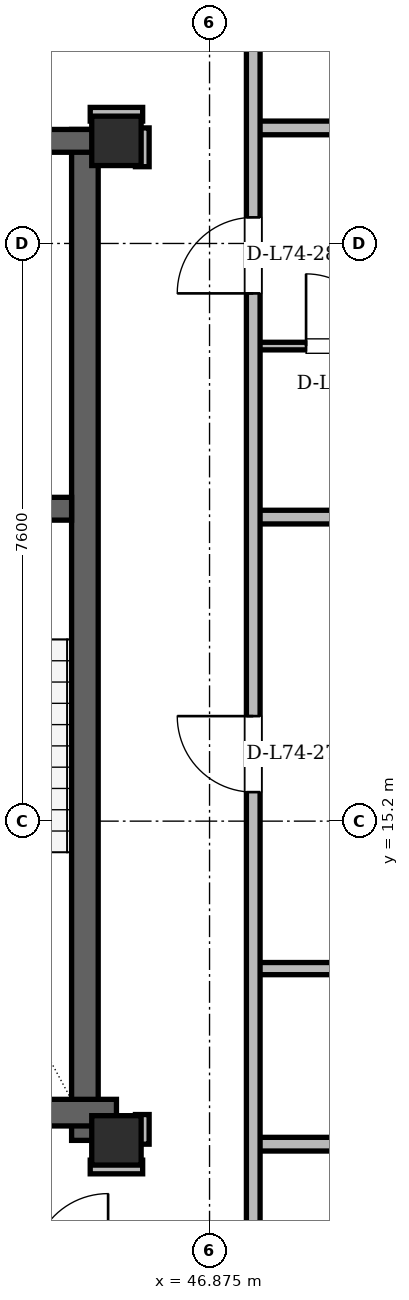
"""IFC4 building model, lengths in metres.
Left out: names, types, materials, properties, quantities, classifications, styles, units other than length and angle.
Written with IfcOpenShell. Run it as: python <this file> out.ifc"""

import sys

from ifc_helpers import new_model, si_unit, direction, frame, frame_2d, origin, origin_2d, place, context, subcontext, project, spatial, rectangle, hollow_rectangle, extrude, element, fill, save


model = new_model("IFC4")
c1 = context("Model", 3, precision=1e-05, world=origin(), true_north=direction((0.0, 1.0)))
c2 = subcontext(c1, "Body", "Model", "MODEL_VIEW")
j1 = project(units=[si_unit("LENGTHUNIT", "METRE"), si_unit("PLANEANGLEUNIT", "RADIAN")], contexts=[c1])
p1 = place(None, origin())
s1 = spatial("IfcSite", under=j1, at=p1, CompositionType="ELEMENT")
p2 = place(p1, origin())
s2 = spatial("IfcBuilding", under=s1, at=p2, CompositionType="ELEMENT")
p3 = place(p2, frame((0.0, 0.0, 281.1)))
s3 = spatial("IfcBuildingStorey", under=s2, at=p3, CompositionType="ELEMENT", Elevation=281.1)
for number, where, z_axis, x_axis in (
    (1, (45.65, 11.0, 0.0), (0.0, 0.0, 1.0), (1.0, 0.0, 0.0)),
    (2, (45.65, 24.15, 0.0), (0.0, 0.0, 1.0), (1.0, 0.0, 0.0)),
):
    element("IfcColumn", number, at=place(p3, frame(where, z_axis=z_axis, x_axis=x_axis)), inside=s3, PredefinedType="COLUMN", context=c2, shape_type="SweptSolid", body=[
        extrude(hollow_rectangle(XDim=0.65, YDim=0.65, WallThickness=0.05, at=origin_2d()), origin(), (0.0, 0.0, 1.0), 3.9),
    ])
p4 = place(p3, frame((45.235, 11.0, 0.0), z_axis=(0.0, 0.0, 1.0), x_axis=(0.0, 1.0, 0.0)))
e3 = element("IfcWall", 3, at=p4, inside=s3, PredefinedType="SHEAR", context=c2, shape_type="SweptSolid", body=[
    extrude(rectangle(XDim=13.3, YDim=0.35, at=frame_2d((6.65, 0.0))), origin(), (0.0, 0.0, 1.0), 3.68),
])
p5 = place(p3, frame((38.55, 11.365, 0.0), z_axis=(0.0, 0.0, 1.0), x_axis=(1.0, 0.0, 0.0)))
e4 = element("IfcWall", 4, at=p5, inside=s3, PredefinedType="SHEAR", context=c2, shape_type="SweptSolid", body=[
    extrude(rectangle(XDim=7.1, YDim=0.35, at=frame_2d((3.55, 0.0))), origin(), (0.0, 0.0, 1.0), 3.68),
])
p6 = place(p3, frame((29.65, 24.15, 0.0), z_axis=(0.0, 0.0, 1.0), x_axis=(1.0, 0.0, 0.0)))
e5 = element("IfcWall", 5, at=p6, inside=s3, PredefinedType="SHEAR", context=c2, shape_type="SweptSolid", body=[
    extrude(rectangle(XDim=15.7, YDim=0.3, at=frame_2d((7.85, 0.0))), origin(), (0.0, 0.0, 1.0), 3.68),
])
p7 = place(p6, frame((1.7, 0.0, 0.0)))
e6 = element("IfcOpeningElement", 6, at=p7, cuts=e5, PredefinedType="OPENING", context=c2, shape_type="SweptSolid", body=[
    extrude(rectangle(XDim=1.2, YDim=2.2, at=frame_2d((0.6, 1.1))), frame((0.0, 0.15, 0.0), z_axis=(0.0, -1.0, 0.0), x_axis=(1.0, 0.0, 0.0)), (0.0, 0.0, 1.0), 0.3),
])
p8 = place(p6, frame((12.8, 0.0, 0.0)))
e7 = element("IfcOpeningElement", 7, at=p8, cuts=e5, PredefinedType="OPENING", context=c2, shape_type="SweptSolid", body=[
    extrude(rectangle(XDim=1.2, YDim=2.2, at=frame_2d((0.6, 1.1))), frame((0.0, 0.15, 0.0), z_axis=(0.0, -1.0, 0.0), x_axis=(1.0, 0.0, 0.0)), (0.0, 0.0, 1.0), 0.3),
])
p9 = place(p6, frame((6.55, 0.0, 0.0)))
e8 = element("IfcOpeningElement", 8, at=p9, cuts=e5, PredefinedType="OPENING", context=c2, shape_type="SweptSolid", body=[
    extrude(rectangle(XDim=0.9, YDim=2.05, at=frame_2d((0.45, 1.025))), frame((0.0, 0.15, 0.0), z_axis=(0.0, -1.0, 0.0), x_axis=(1.0, 0.0, 0.0)), (0.0, 0.0, 1.0), 0.3),
])
p10 = place(p6, frame((8.45, 0.0, 0.0)))
e9 = element("IfcOpeningElement", 9, at=p10, cuts=e5, PredefinedType="OPENING", context=c2, shape_type="SweptSolid", body=[
    extrude(rectangle(XDim=0.9, YDim=2.05, at=frame_2d((0.45, 1.025))), frame((0.0, 0.15, 0.0), z_axis=(0.0, -1.0, 0.0), x_axis=(1.0, 0.0, 0.0)), (0.0, 0.0, 1.0), 0.3),
])
p11 = place(p3, frame((41.05, 19.31, 0.0), z_axis=(0.0, 0.0, 1.0), x_axis=(1.0, 0.0, 0.0)))
e10 = element("IfcWall", 10, at=p11, inside=s3, PredefinedType="SHEAR", context=c2, shape_type="SweptSolid", body=[
    extrude(rectangle(XDim=4.01, YDim=0.3, at=frame_2d((2.005, 0.0))), origin(), (0.0, 0.0, 1.0), 3.68),
])
p12 = place(p11, frame((1.6, 0.0, 0.0)))
e11 = element("IfcOpeningElement", 11, at=p12, cuts=e10, PredefinedType="OPENING", context=c2, shape_type="SweptSolid", body=[
    extrude(rectangle(XDim=1.4, YDim=2.2, at=frame_2d((0.7, 1.1))), frame((0.0, 0.15, 0.0), z_axis=(0.0, -1.0, 0.0), x_axis=(1.0, 0.0, 0.0)), (0.0, 0.0, 1.0), 0.3),
])
p13 = place(p3, frame((58.454, 10.584, 0.0), z_axis=(0.0, 0.0, 1.0), x_axis=(-0.500002460556, 0.866023983177, 0.0)))
e12 = element("IfcWall", 12, at=p13, inside=s3, PredefinedType="SOLIDWALL", context=c2, shape_type="SweptSolid", body=[
    extrude(rectangle(XDim=37.435, YDim=0.29, at=frame_2d((18.718, 0.0))), origin(), (0.0, 0.0, 1.0), 3.058),
])
p14 = place(p13, frame((3.639, 0.0, 0.0)))
e13 = element("IfcOpeningElement", 13, at=p14, cuts=e12, PredefinedType="OPENING", context=c2, shape_type="SweptSolid", body=[
    extrude(rectangle(XDim=1.5, YDim=2.2, at=frame_2d((0.75, 1.1))), frame((0.0, 0.145, 0.0), z_axis=(0.0, -1.0, 0.0), x_axis=(1.0, 0.0, 0.0)), (0.0, 0.0, 1.0), 0.29),
])
p15 = place(p13, frame((27.901, 0.0, 0.0)))
e14 = element("IfcOpeningElement", 14, at=p15, cuts=e12, PredefinedType="OPENING", context=c2, shape_type="SweptSolid", body=[
    extrude(rectangle(XDim=1.5, YDim=2.2, at=frame_2d((0.75, 1.1))), frame((0.0, 0.145, 0.0), z_axis=(0.0, -1.0, 0.0), x_axis=(1.0, 0.0, 0.0)), (0.0, 0.0, 1.0), 0.29),
])
p16 = place(p13, frame((0.782, 0.0, 0.85)))
e15 = element("IfcOpeningElement", 15, at=p16, cuts=e12, PredefinedType="OPENING", context=c2, shape_type="SweptSolid", body=[
    extrude(rectangle(XDim=1.2, YDim=1.48, at=frame_2d((0.6, 0.74))), frame((0.0, 0.145, 0.0), z_axis=(0.0, -1.0, 0.0), x_axis=(1.0, 0.0, 0.0)), (0.0, 0.0, 1.0), 0.29),
])
p17 = place(p13, frame((7.149, 0.0, 0.85)))
e16 = element("IfcOpeningElement", 16, at=p17, cuts=e12, PredefinedType="OPENING", context=c2, shape_type="SweptSolid", body=[
    extrude(rectangle(XDim=2.4, YDim=1.9, at=frame_2d((1.2, 0.95))), frame((0.0, 0.145, 0.0), z_axis=(0.0, -1.0, 0.0), x_axis=(1.0, 0.0, 0.0)), (0.0, 0.0, 1.0), 0.29),
])
p18 = place(p13, frame((35.38, 0.0, 0.85)))
e17 = element("IfcOpeningElement", 17, at=p18, cuts=e12, PredefinedType="OPENING", context=c2, shape_type="SweptSolid", body=[
    extrude(rectangle(XDim=1.2, YDim=1.48, at=frame_2d((0.6, 0.74))), frame((0.0, 0.145, 0.0), z_axis=(0.0, -1.0, 0.0), x_axis=(1.0, 0.0, 0.0)), (0.0, 0.0, 1.0), 0.29),
])
p19 = place(p13, frame((16.994, 0.0, 0.85)))
e18 = element("IfcOpeningElement", 18, at=p19, cuts=e12, PredefinedType="OPENING", context=c2, shape_type="SweptSolid", body=[
    extrude(rectangle(XDim=1.2, YDim=1.48, at=frame_2d((0.6, 0.74))), frame((0.0, 0.145, 0.0), z_axis=(0.0, -1.0, 0.0), x_axis=(1.0, 0.0, 0.0)), (0.0, 0.0, 1.0), 0.29),
])
p20 = place(p13, frame((19.423, 0.0, 0.85)))
e19 = element("IfcOpeningElement", 19, at=p20, cuts=e12, PredefinedType="OPENING", context=c2, shape_type="SweptSolid", body=[
    extrude(rectangle(XDim=1.8, YDim=1.75, at=frame_2d((0.9, 0.875))), frame((0.0, 0.145, 0.0), z_axis=(0.0, -1.0, 0.0), x_axis=(1.0, 0.0, 0.0)), (0.0, 0.0, 1.0), 0.29),
])
p21 = place(p13, frame((22.626, 0.0, 0.85)))
e20 = element("IfcOpeningElement", 20, at=p21, cuts=e12, PredefinedType="OPENING", context=c2, shape_type="SweptSolid", body=[
    extrude(rectangle(XDim=2.2, YDim=1.85, at=frame_2d((1.1, 0.925))), frame((0.0, 0.145, 0.0), z_axis=(0.0, -1.0, 0.0), x_axis=(1.0, 0.0, 0.0)), (0.0, 0.0, 1.0), 0.29),
])
p22 = place(p13, frame((14.598, 0.0, 0.85)))
e21 = element("IfcOpeningElement", 21, at=p22, cuts=e12, PredefinedType="OPENING", context=c2, shape_type="SweptSolid", body=[
    extrude(rectangle(XDim=1.2, YDim=1.48, at=frame_2d((0.6, 0.74))), frame((0.0, 0.145, 0.0), z_axis=(0.0, -1.0, 0.0), x_axis=(1.0, 0.0, 0.0)), (0.0, 0.0, 1.0), 0.29),
])
p23 = place(p3, frame((45.305, 10.65, 0.0), z_axis=(0.0, 0.0, 1.0), x_axis=(1.0, 0.0, 0.0)))
e22 = element("IfcWall", 22, at=p23, inside=s3, PredefinedType="PARTITIONING", context=c2, shape_type="SweptSolid", body=[
    extrude(rectangle(XDim=0.69, YDim=0.18, at=frame_2d((0.345, 0.0))), origin(), (0.0, 0.0, 1.0), 3.68),
])
p24 = place(p3, frame((47.45, 10.95, 0.0), z_axis=(0.0, 0.0, 1.0), x_axis=(1.0, 0.0, 0.0)))
e23 = element("IfcWall", 23, at=p24, inside=s3, PredefinedType="PARTITIONING", context=c2, shape_type="SweptSolid", body=[
    extrude(rectangle(XDim=10.62, YDim=0.18, at=frame_2d((5.31, 0.0))), origin(), (0.0, 0.0, 1.0), 3.266),
])
p25 = place(p3, frame((47.4, 13.26, 0.0), z_axis=(0.0, 0.0, 1.0), x_axis=(1.0, 0.0, 0.0)))
e24 = element("IfcWall", 24, at=p25, inside=s3, PredefinedType="PARTITIONING", context=c2, shape_type="SweptSolid", body=[
    extrude(rectangle(XDim=9.337, YDim=0.16, at=frame_2d((4.668, 0.0))), origin(), (0.0, 0.0, 1.0), 3.68),
])
p26 = place(p25, frame((1.553, 0.0, 0.0)))
e25 = element("IfcOpeningElement", 25, at=p26, cuts=e24, PredefinedType="OPENING", context=c2, shape_type="SweptSolid", body=[
    extrude(rectangle(XDim=0.92, YDim=2.12, at=frame_2d((0.46, 1.06))), frame((0.0, 0.08, 0.0), z_axis=(0.0, -1.0, 0.0), x_axis=(1.0, 0.0, 0.0)), (0.0, 0.0, 1.0), 0.16),
])
p27 = place(p25, frame((5.056, 0.0, 0.0)))
e26 = element("IfcOpeningElement", 26, at=p27, cuts=e24, PredefinedType="OPENING", context=c2, shape_type="SweptSolid", body=[
    extrude(rectangle(XDim=0.95, YDim=2.1, at=frame_2d((0.475, 1.05))), frame((0.0, 0.08, 0.0), z_axis=(0.0, -1.0, 0.0), x_axis=(1.0, 0.0, 0.0)), (0.0, 0.0, 1.0), 0.16),
])
p28 = place(p25, frame((7.771, 0.0, 0.0)))
e27 = element("IfcOpeningElement", 27, at=p28, cuts=e24, PredefinedType="OPENING", context=c2, shape_type="SweptSolid", body=[
    extrude(rectangle(XDim=0.88, YDim=2.08, at=frame_2d((0.44, 1.04))), frame((0.0, 0.08, 0.0), z_axis=(0.0, -1.0, 0.0), x_axis=(1.0, 0.0, 0.0)), (0.0, 0.0, 1.0), 0.16),
])
p29 = place(p3, frame((47.45, 19.2, 0.0), z_axis=(0.0, 0.0, 1.0), x_axis=(1.0, 0.0, 0.0)))
e28 = element("IfcWall", 28, at=p29, inside=s3, PredefinedType="PARTITIONING", context=c2, shape_type="SweptSolid", body=[
    extrude(rectangle(XDim=5.857, YDim=0.18, at=frame_2d((2.929, 0.0))), origin(), (0.0, 0.0, 1.0), 3.68),
])
p30 = place(p3, frame((47.4, 21.45, 0.0), z_axis=(0.0, 0.0, 1.0), x_axis=(1.0, 0.0, 0.0)))
e29 = element("IfcWall", 29, at=p30, inside=s3, PredefinedType="PARTITIONING", context=c2, shape_type="SweptSolid", body=[
    extrude(rectangle(XDim=4.608, YDim=0.1, at=frame_2d((2.304, 0.0))), origin(), (0.0, 0.0, 1.0), 3.68),
])
p31 = place(p30, frame((0.745, 0.0, 0.0)))
e30 = element("IfcOpeningElement", 30, at=p31, cuts=e29, PredefinedType="OPENING", context=c2, shape_type="SweptSolid", body=[
    extrude(rectangle(XDim=0.95, YDim=2.1, at=frame_2d((0.475, 1.05))), frame((0.0, 0.05, 0.0), z_axis=(0.0, -1.0, 0.0), x_axis=(1.0, 0.0, 0.0)), (0.0, 0.0, 1.0), 0.1),
])
p32 = place(p30, frame((3.088, 0.0, 0.0)))
e31 = element("IfcOpeningElement", 31, at=p32, cuts=e29, PredefinedType="OPENING", context=c2, shape_type="SweptSolid", body=[
    extrude(rectangle(XDim=0.88, YDim=2.08, at=frame_2d((0.44, 1.04))), frame((0.0, 0.05, 0.0), z_axis=(0.0, -1.0, 0.0), x_axis=(1.0, 0.0, 0.0)), (0.0, 0.0, 1.0), 0.1),
])
p33 = place(p3, frame((47.45, 24.32, 0.0), z_axis=(0.0, 0.0, 1.0), x_axis=(1.0, 0.0, 0.0)))
e32 = element("IfcWall", 32, at=p33, inside=s3, PredefinedType="PARTITIONING", context=c2, shape_type="SweptSolid", body=[
    extrude(rectangle(XDim=2.901, YDim=0.18, at=frame_2d((1.451, 0.0))), origin(), (0.0, 0.0, 1.0), 3.68),
])
p34 = place(p3, frame((45.305, 24.5, 0.0), z_axis=(0.0, 0.0, 1.0), x_axis=(1.0, 0.0, 0.0)))
e33 = element("IfcWall", 33, at=p34, inside=s3, PredefinedType="PARTITIONING", context=c2, shape_type="SweptSolid", body=[
    extrude(rectangle(XDim=0.69, YDim=0.18, at=frame_2d((0.345, 0.0))), origin(), (0.0, 0.0, 1.0), 3.266),
])
p35 = place(p3, frame((45.99, 10.95, 0.0), z_axis=(0.0, 0.0, 1.0), x_axis=(0.0, 1.0, 0.0)))
e34 = element("IfcWall", 34, at=p35, inside=s3, PredefinedType="PARTITIONING", context=c2, shape_type="SweptSolid", body=[
    extrude(rectangle(XDim=0.39, YDim=0.18, at=frame_2d((0.195, 0.0))), origin(), (0.0, 0.0, 1.0), 3.68),
])
p36 = place(p3, frame((45.99, 23.81, 0.0), z_axis=(0.0, 0.0, 1.0), x_axis=(0.0, 1.0, 0.0)))
e35 = element("IfcWall", 35, at=p36, inside=s3, PredefinedType="PARTITIONING", context=c2, shape_type="SweptSolid", body=[
    extrude(rectangle(XDim=0.51, YDim=0.18, at=frame_2d((0.255, 0.0))), origin(), (0.0, 0.0, 1.0), 3.68),
])
p37 = place(p3, frame((47.45, 9.394, 0.0), z_axis=(0.0, 0.0, 1.0), x_axis=(0.0, 1.0, 0.0)))
e36 = element("IfcWall", 36, at=p37, inside=s3, PredefinedType="PARTITIONING", context=c2, shape_type="SweptSolid", body=[
    extrude(rectangle(XDim=16.482, YDim=0.18, at=frame_2d((8.241, 0.0))), origin(), (0.0, 0.0, 1.0), 3.266),
])
p38 = place(p37, frame((6.188, 0.0, 0.0)))
e37 = element("IfcOpeningElement", 37, at=p38, cuts=e36, PredefinedType="OPENING", context=c2, shape_type="SweptSolid", body=[
    extrude(rectangle(XDim=1.0, YDim=2.18, at=frame_2d((0.5, 1.09))), frame((0.0, 0.09, 0.0), z_axis=(0.0, -1.0, 0.0), x_axis=(1.0, 0.0, 0.0)), (0.0, 0.0, 1.0), 0.18),
])
p39 = place(p37, frame((12.749, 0.0, 0.0)))
e38 = element("IfcOpeningElement", 38, at=p39, cuts=e36, PredefinedType="OPENING", context=c2, shape_type="SweptSolid", body=[
    extrude(rectangle(XDim=1.0, YDim=2.18, at=frame_2d((0.5, 1.09))), frame((0.0, 0.09, 0.0), z_axis=(0.0, -1.0, 0.0), x_axis=(1.0, 0.0, 0.0)), (0.0, 0.0, 1.0), 0.18),
])
p40 = place(p31, origin())
e39 = element("IfcDoor", 39, at=p40, inside=s3, OperationType="SINGLE_SWING_LEFT", PredefinedType="DOOR", context=c2, shape_type="SweptSolid", body=[
    extrude(rectangle(XDim=0.95, YDim=2.1, at=frame_2d((0.475, 1.05))), frame((0.0, 0.025, 0.0), z_axis=(0.0, -1.0, 0.0), x_axis=(1.0, 0.0, 0.0)), (0.0, 0.0, 1.0), 0.05),
])
fill(e30, e39)
p41 = place(p38, origin())
e40 = element("IfcDoor", 40, at=p41, inside=s3, OperationType="SINGLE_SWING_RIGHT", PredefinedType="DOOR", context=c2, shape_type="SweptSolid", body=[
    extrude(rectangle(XDim=1.0, YDim=2.18, at=frame_2d((0.5, 1.09))), frame((0.0, 0.025, 0.0), z_axis=(0.0, -1.0, 0.0), x_axis=(1.0, 0.0, 0.0)), (0.0, 0.0, 1.0), 0.05),
])
fill(e37, e40)
p42 = place(p39, origin())
e41 = element("IfcDoor", 41, at=p42, inside=s3, OperationType="SINGLE_SWING_LEFT", PredefinedType="DOOR", context=c2, shape_type="SweptSolid", body=[
    extrude(rectangle(XDim=1.0, YDim=2.18, at=frame_2d((0.5, 1.09))), frame((0.0, 0.025, 0.0), z_axis=(0.0, -1.0, 0.0), x_axis=(1.0, 0.0, 0.0)), (0.0, 0.0, 1.0), 0.05),
])
fill(e38, e41)
save(model, sys.argv[1])
